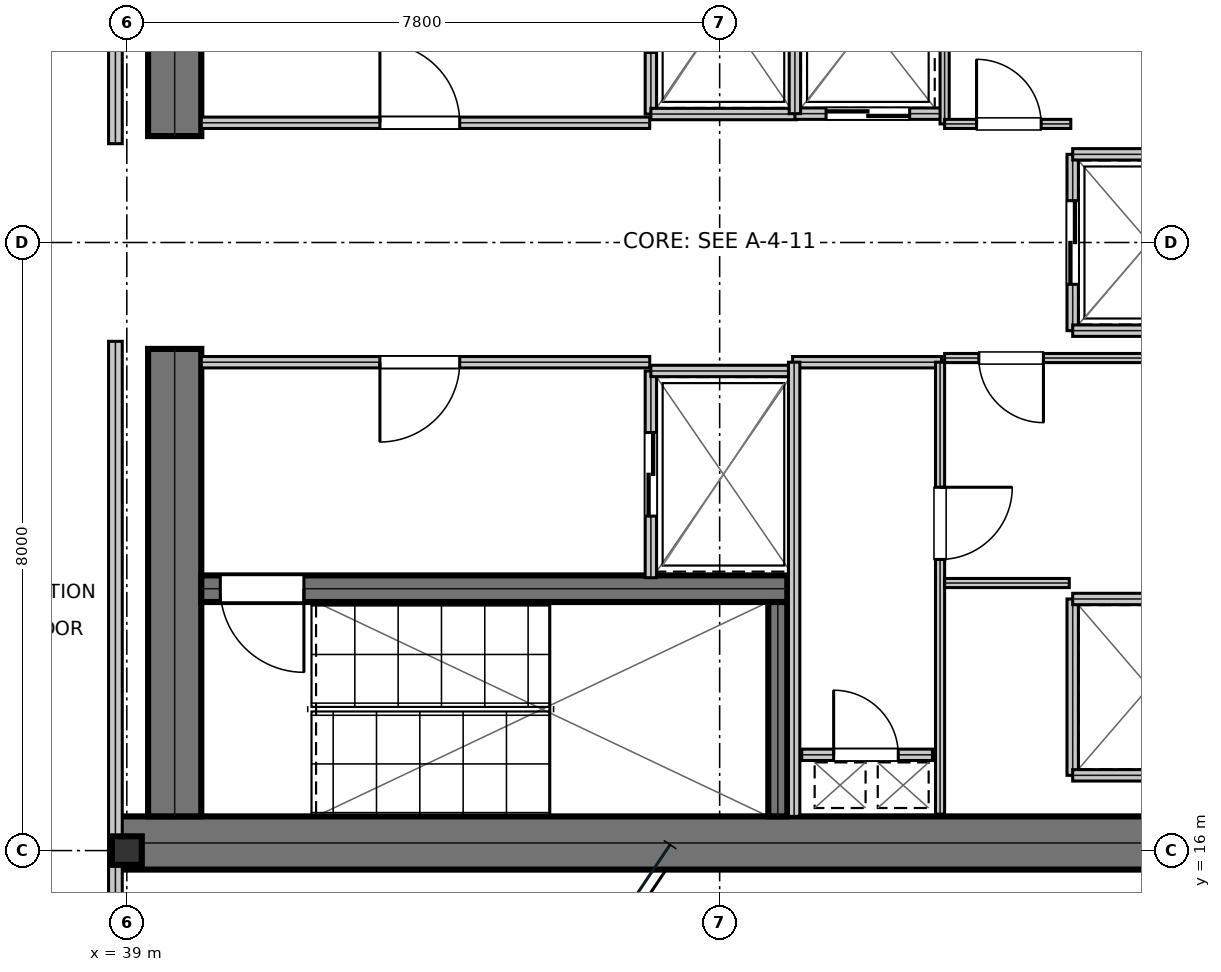
"""IFC4 building model, lengths in metres.
Left out: names, types, materials, properties, quantities, classifications, styles, units other than length and angle.
Written with IfcOpenShell. Run it as: python <this file> out.ifc"""

import sys

from ifc_helpers import new_model, si_unit, direction, frame, frame_2d, origin, origin_2d, place, context, subcontext, project, spatial, rectangle, i_section, extrude, element, fill, save


model = new_model("IFC4")
c1 = context("Model", 3, precision=1e-05, world=origin(), true_north=direction((0.0, 1.0)))
c2 = subcontext(c1, "Body", "Model", "MODEL_VIEW")
j1 = project(units=[si_unit("LENGTHUNIT", "METRE"), si_unit("PLANEANGLEUNIT", "RADIAN")], contexts=[c1])
p1 = place(None, origin())
s1 = spatial("IfcSite", under=j1, at=p1, CompositionType="ELEMENT")
p2 = place(p1, origin())
s2 = spatial("IfcBuilding", under=s1, at=p2, CompositionType="ELEMENT")
p3 = place(p2, frame((0.0, 0.0, 212.1)))
s3 = spatial("IfcBuildingStorey", under=s2, at=p3, CompositionType="ELEMENT", Elevation=212.1)
p4 = place(p3, frame((38.8, 16.1, 0.0), z_axis=(0.0, 0.0, 1.0), x_axis=(1.0, 0.0, 0.0)))
e1 = element("IfcWall", 1, at=p4, inside=s3, PredefinedType="SHEAR", context=c2, shape_type="SweptSolid", body=[
    extrude(rectangle(XDim=16.0, YDim=0.7, at=frame_2d((8.0, 0.0))), origin(), (0.0, 0.0, 1.0), 3.79),
])
for number, where, z_axis, x_axis in (
    (2, (39.63, 16.45, 0.0), (0.0, 0.0, 1.0), (0.0, 1.0, 0.0)),
    (3, (39.63, 25.4, 0.0), (0.0, 0.0, 1.0), (0.0, 1.0, 0.0)),
):
    element("IfcWall", number, at=place(p3, frame(where, z_axis=z_axis, x_axis=x_axis)), inside=s3, PredefinedType="SHEAR", context=c2, shape_type="SweptSolid", body=[
        extrude(rectangle(XDim=6.15, YDim=0.7, at=frame_2d((3.075, 0.0))), origin(), (0.0, 0.0, 1.0), 3.79),
    ])
p5 = place(p3, frame((39.98, 19.445, 0.0), z_axis=(0.0, 0.0, 1.0), x_axis=(1.0, 0.0, 0.0)))
e4 = element("IfcWall", 4, at=p5, inside=s3, PredefinedType="SHEAR", context=c2, shape_type="SweptSolid", body=[
    extrude(rectangle(XDim=7.71, YDim=0.35, at=frame_2d((3.855, 0.0))), origin(), (0.0, 0.0, 1.0), 3.79),
])
p6 = place(p5, frame((0.25, 0.0, 0.0)))
e5 = element("IfcOpeningElement", 5, at=p6, cuts=e4, PredefinedType="OPENING", context=c2, shape_type="SweptSolid", body=[
    extrude(rectangle(XDim=1.1, YDim=2.15, at=frame_2d((0.55, 1.075))), frame((0.0, 0.185, 0.0), z_axis=(0.0, -1.0, 0.0), x_axis=(1.0, 0.0, 0.0)), (0.0, 0.0, 1.0), 0.37),
])
p7 = place(p3, frame((47.565, 16.45, 0.0), z_axis=(0.0, 0.0, 1.0), x_axis=(0.0, 1.0, 0.0)))
e6 = element("IfcWall", 6, at=p7, inside=s3, PredefinedType="SHEAR", context=c2, shape_type="SweptSolid", body=[
    extrude(rectangle(XDim=2.82, YDim=0.25, at=frame_2d((1.41, 0.0))), origin(), (0.0, 0.0, 1.0), 3.79),
])
p8 = place(p3, frame((39.0, 16.0, 0.0), z_axis=(0.0, 0.0, 1.0), x_axis=(1.0, 0.0, 0.0)))
e7 = element("IfcColumn", 7, at=p8, inside=s3, PredefinedType="COLUMN", context=c2, shape_type="SweptSolid", body=[
    extrude(i_section(OverallWidth=0.394, OverallDepth=0.375, WebThickness=0.017, FlangeThickness=0.028, at=origin_2d()), origin(), (0.0, 0.0, 1.0), 4.044),
])
p9 = place(p3, frame((39.98, 25.575, 0.0), z_axis=(0.0, 0.0, 1.0), x_axis=(1.0, 0.0, 0.0)))
e8 = element("IfcWall", 8, at=p9, inside=s3, PredefinedType="PARTITIONING", context=c2, shape_type="SweptSolid", body=[
    extrude(rectangle(XDim=5.9, YDim=0.15, at=frame_2d((2.95, 0.0))), origin(), (0.0, 0.0, 1.0), 3.79),
])
p10 = place(p9, frame((2.35, 0.0, 0.0)))
e9 = element("IfcOpeningElement", 9, at=p10, cuts=e8, PredefinedType="OPENING", context=c2, shape_type="SweptSolid", body=[
    extrude(rectangle(XDim=1.05, YDim=2.15, at=frame_2d((0.525, 1.075))), frame((0.0, 0.085, 0.0), z_axis=(0.0, -1.0, 0.0), x_axis=(1.0, 0.0, 0.0)), (0.0, 0.0, 1.0), 0.17),
])
p11 = place(p3, frame((39.98, 22.425, 0.0), z_axis=(0.0, 0.0, 1.0), x_axis=(1.0, 0.0, 0.0)))
e10 = element("IfcWall", 10, at=p11, inside=s3, PredefinedType="PARTITIONING", context=c2, shape_type="SweptSolid", body=[
    extrude(rectangle(XDim=5.9, YDim=0.15, at=frame_2d((2.95, 0.0))), origin(), (0.0, 0.0, 1.0), 3.79),
])
p12 = place(p11, frame((2.35, 0.0, 0.0)))
e11 = element("IfcOpeningElement", 11, at=p12, cuts=e10, PredefinedType="OPENING", context=c2, shape_type="SweptSolid", body=[
    extrude(rectangle(XDim=1.05, YDim=2.15, at=frame_2d((0.525, 1.075))), frame((0.0, 0.085, 0.0), z_axis=(0.0, -1.0, 0.0), x_axis=(1.0, 0.0, 0.0)), (0.0, 0.0, 1.0), 0.17),
])
p13 = place(p3, frame((45.895, 25.69, 0.0), z_axis=(0.0, 0.0, 1.0), x_axis=(0.0, 1.0, 0.0)))
e12 = element("IfcWall", 12, at=p13, inside=s3, PredefinedType="PARTITIONING", context=c2, shape_type="SweptSolid", body=[
    extrude(rectangle(XDim=2.72, YDim=0.15, at=frame_2d((1.36, 0.0))), origin(), (0.0, 0.0, 1.0), 3.79),
])
p14 = place(p13, frame((0.81, 0.0, 0.0)))
e13 = element("IfcOpeningElement", 13, at=p14, cuts=e12, PredefinedType="OPENING", context=c2, shape_type="SweptSolid", body=[
    extrude(rectangle(XDim=1.1, YDim=2.15, at=frame_2d((0.55, 1.075))), frame((0.0, 0.085, 0.0), z_axis=(0.0, -1.0, 0.0), x_axis=(1.0, 0.0, 0.0)), (0.0, 0.0, 1.0), 0.17),
])
p15 = place(p3, frame((45.895, 25.69, 0.0), z_axis=(0.0, 0.0, 1.0), x_axis=(1.0, 0.0, 0.0)))
e14 = element("IfcWall", 14, at=p15, inside=s3, PredefinedType="PARTITIONING", context=c2, shape_type="SweptSolid", body=[
    extrude(rectangle(XDim=1.915, YDim=0.15, at=frame_2d((0.958, 0.0))), origin(), (0.0, 0.0, 1.0), 3.79),
])
p16 = place(p3, frame((45.895, 19.59, 0.0), z_axis=(0.0, 0.0, 1.0), x_axis=(0.0, 1.0, 0.0)))
e15 = element("IfcWall", 15, at=p16, inside=s3, PredefinedType="PARTITIONING", context=c2, shape_type="SweptSolid", body=[
    extrude(rectangle(XDim=2.72, YDim=0.15, at=frame_2d((1.36, 0.0))), origin(), (0.0, 0.0, 1.0), 3.79),
])
p17 = place(p16, frame((0.81, 0.0, 0.0)))
e16 = element("IfcOpeningElement", 16, at=p17, cuts=e15, PredefinedType="OPENING", context=c2, shape_type="SweptSolid", body=[
    extrude(rectangle(XDim=1.1, YDim=2.15, at=frame_2d((0.55, 1.075))), frame((0.0, 0.085, 0.0), z_axis=(0.0, -1.0, 0.0), x_axis=(1.0, 0.0, 0.0)), (0.0, 0.0, 1.0), 0.17),
])
p18 = place(p3, frame((45.895, 22.31, 0.0), z_axis=(0.0, 0.0, 1.0), x_axis=(1.0, 0.0, 0.0)))
e17 = element("IfcWall", 17, at=p18, inside=s3, PredefinedType="PARTITIONING", context=c2, shape_type="SweptSolid", body=[
    extrude(rectangle(XDim=1.915, YDim=0.15, at=frame_2d((0.958, 0.0))), origin(), (0.0, 0.0, 1.0), 3.79),
])
p19 = place(p3, frame((47.79, 25.695, 0.0), z_axis=(0.0, 0.0, 1.0), x_axis=(1.0, 0.0, 0.0)))
e18 = element("IfcWall", 18, at=p19, inside=s3, PredefinedType="PARTITIONING", context=c2, shape_type="SweptSolid", body=[
    extrude(rectangle(XDim=1.92, YDim=0.15, at=frame_2d((0.96, 0.0))), origin(), (0.0, 0.0, 1.0), 3.79),
])
p20 = place(p19, frame((0.41, 0.0, 0.0)))
e19 = element("IfcOpeningElement", 19, at=p20, cuts=e18, PredefinedType="OPENING", context=c2, shape_type="SweptSolid", body=[
    extrude(rectangle(XDim=1.1, YDim=2.15, at=frame_2d((0.55, 1.075))), frame((0.0, 0.085, 0.0), z_axis=(0.0, -1.0, 0.0), x_axis=(1.0, 0.0, 0.0)), (0.0, 0.0, 1.0), 0.17),
])
p21 = place(p3, frame((47.79, 25.695, 0.0), z_axis=(0.0, 0.0, 1.0), x_axis=(0.0, 1.0, 0.0)))
e20 = element("IfcWall", 20, at=p21, inside=s3, PredefinedType="PARTITIONING", context=c2, shape_type="SweptSolid", body=[
    extrude(rectangle(XDim=2.415, YDim=0.15, at=frame_2d((1.208, 0.0))), origin(), (0.0, 0.0, 1.0), 3.79),
])
p22 = place(p3, frame((51.445, 22.84, 0.0), z_axis=(0.0, 0.0, 1.0), x_axis=(0.0, 1.0, 0.0)))
e21 = element("IfcWall", 21, at=p22, inside=s3, PredefinedType="PARTITIONING", context=c2, shape_type="SweptSolid", body=[
    extrude(rectangle(XDim=2.32, YDim=0.15, at=frame_2d((1.16, 0.0))), origin(), (0.0, 0.0, 1.0), 3.79),
])
p23 = place(p22, frame((0.61, 0.0, 0.0)))
e22 = element("IfcOpeningElement", 22, at=p23, cuts=e21, PredefinedType="OPENING", context=c2, shape_type="SweptSolid", body=[
    extrude(rectangle(XDim=1.1, YDim=2.15, at=frame_2d((0.55, 1.075))), frame((0.0, 0.085, 0.0), z_axis=(0.0, -1.0, 0.0), x_axis=(1.0, 0.0, 0.0)), (0.0, 0.0, 1.0), 0.17),
])
for number, where, z_axis, x_axis in (
    (23, (51.445, 22.84, 0.0), (0.0, 0.0, 1.0), (1.0, 0.0, 0.0)),
    (24, (51.445, 25.16, 0.0), (0.0, 0.0, 1.0), (1.0, 0.0, 0.0)),
):
    element("IfcWall", number, at=place(p3, frame(where, z_axis=z_axis, x_axis=x_axis)), inside=s3, PredefinedType="PARTITIONING", context=c2, shape_type="SweptSolid", body=[
        extrude(rectangle(XDim=2.015, YDim=0.15, at=frame_2d((1.007, 0.0))), origin(), (0.0, 0.0, 1.0), 3.79),
    ])
p24 = place(p3, frame((51.445, 16.99, 0.0), z_axis=(0.0, 0.0, 1.0), x_axis=(0.0, 1.0, 0.0)))
e25 = element("IfcWall", 25, at=p24, inside=s3, PredefinedType="PARTITIONING", context=c2, shape_type="SweptSolid", body=[
    extrude(rectangle(XDim=2.32, YDim=0.15, at=frame_2d((1.16, 0.0))), origin(), (0.0, 0.0, 1.0), 3.79),
])
for number, where, z_axis, x_axis in (
    (26, (51.445, 16.99, 0.0), (0.0, 0.0, 1.0), (1.0, 0.0, 0.0)),
    (27, (51.445, 19.31, 0.0), (0.0, 0.0, 1.0), (1.0, 0.0, 0.0)),
):
    element("IfcWall", number, at=place(p3, frame(where, z_axis=z_axis, x_axis=x_axis)), inside=s3, PredefinedType="PARTITIONING", context=c2, shape_type="SweptSolid", body=[
        extrude(rectangle(XDim=2.015, YDim=0.15, at=frame_2d((1.007, 0.0))), origin(), (0.0, 0.0, 1.0), 3.79),
    ])
p25 = place(p3, frame((47.88, 17.26, 0.0), z_axis=(0.0, 0.0, 1.0), x_axis=(1.0, 0.0, 0.0)))
e28 = element("IfcWall", 28, at=p25, inside=s3, PredefinedType="PARTITIONING", context=c2, shape_type="SweptSolid", body=[
    extrude(rectangle(XDim=1.72, YDim=0.15, at=frame_2d((0.86, 0.0))), origin(), (0.0, 0.0, 1.0), 3.79),
])
p26 = place(p25, frame((0.42, 0.0, 0.0)))
e29 = element("IfcOpeningElement", 29, at=p26, cuts=e28, PredefinedType="OPENING", context=c2, shape_type="SweptSolid", body=[
    extrude(rectangle(XDim=0.85, YDim=2.15, at=frame_2d((0.425, 1.075))), frame((0.0, 0.085, 0.0), z_axis=(0.0, -1.0, 0.0), x_axis=(1.0, 0.0, 0.0)), (0.0, 0.0, 1.0), 0.17),
])
p27 = place(p3, frame((47.76, 22.425, 0.0), z_axis=(0.0, 0.0, 1.0), x_axis=(1.0, 0.0, 0.0)))
e30 = element("IfcWall", 30, at=p27, inside=s3, PredefinedType="PARTITIONING", context=c2, shape_type="SweptSolid", body=[
    extrude(rectangle(XDim=1.96, YDim=0.15, at=frame_2d((0.98, 0.0))), origin(), (0.0, 0.0, 1.0), 3.79),
])
p28 = place(p3, frame((47.78, 16.45, 0.0), z_axis=(0.0, 0.0, 1.0), x_axis=(0.0, 1.0, 0.0)))
e31 = element("IfcWall", 31, at=p28, inside=s3, PredefinedType="PARTITIONING", context=c2, shape_type="SweptSolid", body=[
    extrude(rectangle(XDim=5.975, YDim=0.15, at=frame_2d((2.988, 0.0))), origin(), (0.0, 0.0, 1.0), 3.79),
])
p29 = place(p3, frame((49.7, 16.48, 0.0), z_axis=(0.0, 0.0, 1.0), x_axis=(0.0, 1.0, 0.0)))
e32 = element("IfcWall", 32, at=p29, inside=s3, PredefinedType="PARTITIONING", context=c2, shape_type="SweptSolid", body=[
    extrude(rectangle(XDim=5.945, YDim=0.12, at=frame_2d((2.973, 0.0))), origin(), (0.0, 0.0, 1.0), 3.79),
])
p30 = place(p29, frame((3.35, 0.0, 0.0)))
e33 = element("IfcOpeningElement", 33, at=p30, cuts=e32, PredefinedType="OPENING", context=c2, shape_type="SweptSolid", body=[
    extrude(rectangle(XDim=0.95, YDim=2.15, at=frame_2d((0.475, 1.075))), frame((0.0, 0.07, 0.0), z_axis=(0.0, -1.0, 0.0), x_axis=(1.0, 0.0, 0.0)), (0.0, 0.0, 1.0), 0.14),
])
p31 = place(p3, frame((49.76, 22.48, 0.0), z_axis=(0.0, 0.0, 1.0), x_axis=(1.0, 0.0, 0.0)))
e34 = element("IfcWall", 34, at=p31, inside=s3, PredefinedType="PARTITIONING", context=c2, shape_type="SweptSolid", body=[
    extrude(rectangle(XDim=3.9, YDim=0.12, at=frame_2d((1.95, 0.0))), origin(), (0.0, 0.0, 1.0), 3.79),
])
p32 = place(p31, frame((0.45, 0.0, 0.0)))
e35 = element("IfcOpeningElement", 35, at=p32, cuts=e34, PredefinedType="OPENING", context=c2, shape_type="SweptSolid", body=[
    extrude(rectangle(XDim=0.85, YDim=2.15, at=frame_2d((0.425, 1.075))), frame((0.0, 0.07, 0.0), z_axis=(0.0, -1.0, 0.0), x_axis=(1.0, 0.0, 0.0)), (0.0, 0.0, 1.0), 0.14),
])
p33 = place(p3, frame((49.76, 19.52, 0.0), z_axis=(0.0, 0.0, 1.0), x_axis=(1.0, 0.0, 0.0)))
e36 = element("IfcWall", 36, at=p33, inside=s3, PredefinedType="PARTITIONING", context=c2, shape_type="SweptSolid", body=[
    extrude(rectangle(XDim=1.64, YDim=0.12, at=frame_2d((0.82, 0.0))), origin(), (0.0, 0.0, 1.0), 3.79),
])
p34 = place(p3, frame((49.76, 25.56, 0.0), z_axis=(0.0, 0.0, 1.0), x_axis=(0.0, 1.0, 0.0)))
e37 = element("IfcWall", 37, at=p34, inside=s3, PredefinedType="PARTITIONING", context=c2, shape_type="SweptSolid", body=[
    extrude(rectangle(XDim=2.66, YDim=0.12, at=frame_2d((1.33, 0.0))), origin(), (0.0, 0.0, 1.0), 3.79),
])
p35 = place(p3, frame((49.76, 25.56, 0.0), z_axis=(0.0, 0.0, 1.0), x_axis=(1.0, 0.0, 0.0)))
e38 = element("IfcWall", 38, at=p35, inside=s3, PredefinedType="PARTITIONING", context=c2, shape_type="SweptSolid", body=[
    extrude(rectangle(XDim=1.66, YDim=0.12, at=frame_2d((0.83, 0.0))), origin(), (0.0, 0.0, 1.0), 3.79),
])
p36 = place(p35, frame((0.42, 0.0, 0.0)))
e39 = element("IfcOpeningElement", 39, at=p36, cuts=e38, PredefinedType="OPENING", context=c2, shape_type="SweptSolid", body=[
    extrude(rectangle(XDim=0.85, YDim=2.15, at=frame_2d((0.425, 1.075))), frame((0.0, 0.07, 0.0), z_axis=(0.0, -1.0, 0.0), x_axis=(1.0, 0.0, 0.0)), (0.0, 0.0, 1.0), 0.14),
])
p37 = place(p3, frame((38.85, 14.5, 0.0), z_axis=(0.0, 0.0, 1.0), x_axis=(0.0, 1.0, 0.0)))
e40 = element("IfcWall", 40, at=p37, inside=s3, PredefinedType="SOLIDWALL", context=c2, shape_type="SweptSolid", body=[
    extrude(rectangle(XDim=8.2, YDim=0.18, at=frame_2d((4.1, 0.0))), origin(), (0.0, 0.0, 1.0), 3.241),
])
p38 = place(p3, frame((38.85, 25.3, 0.0), z_axis=(0.0, 0.0, 1.0), x_axis=(0.0, 1.0, 0.0)))
e41 = element("IfcWall", 41, at=p38, inside=s3, PredefinedType="SOLIDWALL", context=c2, shape_type="SweptSolid", body=[
    extrude(rectangle(XDim=8.198, YDim=0.18, at=frame_2d((4.099, 0.0))), origin(), (0.0, 0.0, 1.0), 3.241),
])
p39 = place(p10, origin())
e42 = element("IfcDoor", 42, at=p39, inside=s3, OperationType="SINGLE_SWING_LEFT", PredefinedType="DOOR", context=c2, shape_type="SweptSolid", body=[
    extrude(rectangle(XDim=1.05, YDim=2.15, at=frame_2d((0.525, 1.075))), frame((0.0, 0.025, 0.0), z_axis=(0.0, -1.0, 0.0), x_axis=(1.0, 0.0, 0.0)), (0.0, 0.0, 1.0), 0.05),
])
fill(e9, e42)
p40 = place(p12, frame((1.05, 0.0, 0.0), z_axis=(0.0, 0.0, 1.0), x_axis=(-1.0, 0.0, 0.0)))
e43 = element("IfcDoor", 43, at=p40, inside=s3, OperationType="SINGLE_SWING_RIGHT", PredefinedType="DOOR", context=c2, shape_type="SweptSolid", body=[
    extrude(rectangle(XDim=1.05, YDim=2.15, at=frame_2d((0.525, 1.075))), frame((0.0, 0.025, 0.0), z_axis=(0.0, -1.0, 0.0), x_axis=(1.0, 0.0, 0.0)), (0.0, 0.0, 1.0), 0.05),
])
fill(e11, e43)
p41 = place(p17, frame((1.1, 0.0, 0.0), z_axis=(0.0, 0.0, 1.0), x_axis=(-1.0, 0.0, 0.0)))
e44 = element("IfcDoor", 44, at=p41, inside=s3, OperationType="DOUBLE_DOOR_SLIDING", PredefinedType="DOOR", context=c2, shape_type="SweptSolid", body=[
    extrude(rectangle(XDim=1.1, YDim=2.15, at=frame_2d((0.55, 1.075))), frame((0.0, 0.025, 0.0), z_axis=(0.0, -1.0, 0.0), x_axis=(1.0, 0.0, 0.0)), (0.0, 0.0, 1.0), 0.05),
])
fill(e16, e44)
p42 = place(p20, frame((1.1, 0.0, 0.0), z_axis=(0.0, 0.0, 1.0), x_axis=(-1.0, 0.0, 0.0)))
e45 = element("IfcDoor", 45, at=p42, inside=s3, OperationType="DOUBLE_DOOR_SLIDING", PredefinedType="DOOR", context=c2, shape_type="SweptSolid", body=[
    extrude(rectangle(XDim=1.1, YDim=2.15, at=frame_2d((0.55, 1.075))), frame((0.0, 0.025, 0.0), z_axis=(0.0, -1.0, 0.0), x_axis=(1.0, 0.0, 0.0)), (0.0, 0.0, 1.0), 0.05),
])
fill(e19, e45)
p43 = place(p23, frame((1.1, 0.0, 0.0), z_axis=(0.0, 0.0, 1.0), x_axis=(-1.0, 0.0, 0.0)))
e46 = element("IfcDoor", 46, at=p43, inside=s3, OperationType="DOUBLE_DOOR_SLIDING", PredefinedType="DOOR", context=c2, shape_type="SweptSolid", body=[
    extrude(rectangle(XDim=1.1, YDim=2.15, at=frame_2d((0.55, 1.075))), frame((0.0, 0.025, 0.0), z_axis=(0.0, -1.0, 0.0), x_axis=(1.0, 0.0, 0.0)), (0.0, 0.0, 1.0), 0.05),
])
fill(e22, e46)
p44 = place(p26, origin())
e47 = element("IfcDoor", 47, at=p44, inside=s3, OperationType="SINGLE_SWING_LEFT", PredefinedType="TRAPDOOR", context=c2, shape_type="SweptSolid", body=[
    extrude(rectangle(XDim=0.85, YDim=2.15, at=frame_2d((0.425, 1.075))), frame((0.0, 0.025, 0.0), z_axis=(0.0, -1.0, 0.0), x_axis=(1.0, 0.0, 0.0)), (0.0, 0.0, 1.0), 0.05),
])
fill(e29, e47)
p45 = place(p30, frame((0.95, 0.0, 0.0), z_axis=(0.0, 0.0, 1.0), x_axis=(-1.0, 0.0, 0.0)))
e48 = element("IfcDoor", 48, at=p45, inside=s3, OperationType="SINGLE_SWING_LEFT", PredefinedType="DOOR", context=c2, shape_type="SweptSolid", body=[
    extrude(rectangle(XDim=0.95, YDim=2.15, at=frame_2d((0.475, 1.075))), frame((0.0, 0.025, 0.0), z_axis=(0.0, -1.0, 0.0), x_axis=(1.0, 0.0, 0.0)), (0.0, 0.0, 1.0), 0.05),
])
fill(e33, e48)
p46 = place(p32, frame((0.85, 0.0, 0.0), z_axis=(0.0, 0.0, 1.0), x_axis=(-1.0, 0.0, 0.0)))
e49 = element("IfcDoor", 49, at=p46, inside=s3, OperationType="SINGLE_SWING_LEFT", PredefinedType="DOOR", context=c2, shape_type="SweptSolid", body=[
    extrude(rectangle(XDim=0.85, YDim=2.15, at=frame_2d((0.425, 1.075))), frame((0.0, 0.025, 0.0), z_axis=(0.0, -1.0, 0.0), x_axis=(1.0, 0.0, 0.0)), (0.0, 0.0, 1.0), 0.05),
])
fill(e35, e49)
p47 = place(p36, origin())
e50 = element("IfcDoor", 50, at=p47, inside=s3, OperationType="SINGLE_SWING_LEFT", PredefinedType="DOOR", context=c2, shape_type="SweptSolid", body=[
    extrude(rectangle(XDim=0.85, YDim=2.15, at=frame_2d((0.425, 1.075))), frame((0.0, 0.025, 0.0), z_axis=(0.0, -1.0, 0.0), x_axis=(1.0, 0.0, 0.0)), (0.0, 0.0, 1.0), 0.05),
])
fill(e39, e50)
p48 = place(p6, frame((1.1, 0.0, 0.0), z_axis=(0.0, 0.0, 1.0), x_axis=(-1.0, 0.0, 0.0)))
e51 = element("IfcDoor", 51, at=p48, inside=s3, OperationType="SINGLE_SWING_LEFT", PredefinedType="DOOR", context=c2, shape_type="SweptSolid", body=[
    extrude(rectangle(XDim=1.1, YDim=2.15, at=frame_2d((0.55, 1.075))), frame((0.0, 0.025, 0.0), z_axis=(0.0, -1.0, 0.0), x_axis=(1.0, 0.0, 0.0)), (0.0, 0.0, 1.0), 0.05),
])
fill(e5, e51)
save(model, sys.argv[1])
